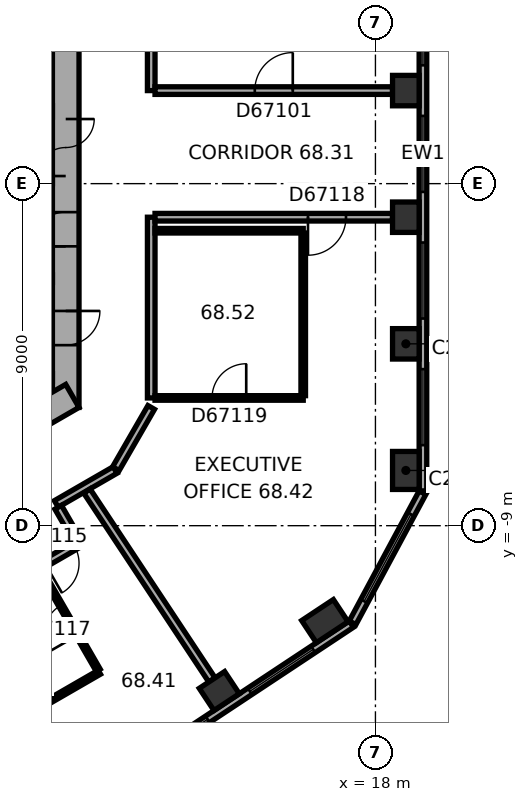
"""IFC4 building model, lengths in metres.
Left out: names, types, materials, properties, quantities, classifications, styles, units other than length and angle.
Written with IfcOpenShell. Run it as: python <this file> out.ifc"""

import sys

from ifc_helpers import new_model, si_unit, direction, frame, frame_2d, origin, origin_2d, place, context, subcontext, project, spatial, rectangle, extrude, element, fill, save


model = new_model("IFC4")
c1 = context("Model", 3, precision=1e-05, world=origin(), true_north=direction((0.0, 1.0)))
c2 = subcontext(c1, "Body", "Model", "MODEL_VIEW")
j1 = project(units=[si_unit("LENGTHUNIT", "METRE"), si_unit("PLANEANGLEUNIT", "RADIAN")], contexts=[c1])
p1 = place(None, origin())
s1 = spatial("IfcSite", under=j1, at=p1, CompositionType="ELEMENT")
p2 = place(p1, origin())
s2 = spatial("IfcBuilding", under=s1, at=p2, CompositionType="ELEMENT")
p3 = place(p2, frame((0.0, 0.0, 274.6)))
s3 = spatial("IfcBuildingStorey", under=s2, at=p3, CompositionType="ELEMENT", Elevation=274.6)
p4 = place(p3, frame((18.8, -7.547, 0.0), z_axis=(0.0, 0.0, 1.0), x_axis=(0.0, 1.0, 0.0)))
e1 = element("IfcColumn", 1, at=p4, inside=s3, PredefinedType="COLUMN", context=c2, shape_type="SweptSolid", body=[
    extrude(rectangle(XDim=1.0, YDim=0.7, at=origin_2d()), origin(), (0.0, 0.0, 1.0), 3.7),
])
for number, where, z_axis, x_axis in (
    (2, (18.8, -4.215, 0.0), (0.0, 0.0, 1.0), (0.0, 1.0, 0.0)),
    (3, (18.8, -0.883, 0.0), (0.0, 0.0, 1.0), (0.0, 1.0, 0.0)),
    (4, (18.8, 2.448, 0.0), (0.0, 0.0, 1.0), (0.0, 1.0, 0.0)),
    (5, (13.891, -13.351, 0.0), (0.0, 0.0, 1.0), (0.834, 0.552, 0.0)),
):
    element("IfcColumn", number, at=place(p3, frame(where, z_axis=z_axis, x_axis=x_axis)), inside=s3, PredefinedType="COLUMN", context=c2, shape_type="SweptSolid", body=[
        extrude(rectangle(XDim=0.8, YDim=0.7, at=origin_2d()), origin(), (0.0, 0.0, 1.0), 3.7),
    ])
p5 = place(p3, frame((16.669, -11.512, 0.0), z_axis=(0.0, 0.0, 1.0), x_axis=(0.833885822067, 0.551936985312, 0.0)))
e6 = element("IfcColumn", 6, at=p5, inside=s3, PredefinedType="COLUMN", context=c2, shape_type="SweptSolid", body=[
    extrude(rectangle(XDim=1.0, YDim=0.7, at=origin_2d()), origin(), (0.0, 0.0, 1.0), 3.7),
])
p6 = place(p3, frame((9.85, -5.889, 0.0), z_axis=(0.0, 0.0, 1.0), x_axis=(0.0, 1.0, 0.0)))
e7 = element("IfcWall", 7, at=p6, inside=s3, PredefinedType="SHEAR", context=c2, shape_type="SweptSolid", body=[
    extrude(rectangle(XDim=11.778, YDim=0.7, at=frame_2d((5.889, 0.0))), origin(), (0.0, 0.0, 1.0), 3.7),
])
p7 = place(p6, frame((6.089, 0.0, 0.0)))
e8 = element("IfcOpeningElement", 8, at=p7, cuts=e7, PredefinedType="OPENING", context=c2, shape_type="SweptSolid", body=[
    extrude(rectangle(XDim=1.5, YDim=2.1, at=frame_2d((0.75, 1.05))), frame((0.0, 0.36, 0.0), z_axis=(0.0, -1.0, 0.0), x_axis=(1.0, 0.0, 0.0)), (0.0, 0.0, 1.0), 0.72),
])
p8 = place(p6, frame((1.639, 0.0, 0.0)))
e9 = element("IfcOpeningElement", 9, at=p8, cuts=e7, PredefinedType="OPENING", context=c2, shape_type="SweptSolid", body=[
    extrude(rectangle(XDim=0.9, YDim=2.1, at=frame_2d((0.45, 1.05))), frame((0.0, 0.36, 0.0), z_axis=(0.0, -1.0, 0.0), x_axis=(1.0, 0.0, 0.0)), (0.0, 0.0, 1.0), 0.72),
])
p9 = place(p6, frame((4.239, 0.0, 0.0)))
e10 = element("IfcOpeningElement", 10, at=p9, cuts=e7, PredefinedType="OPENING", context=c2, shape_type="SweptSolid", body=[
    extrude(rectangle(XDim=0.9, YDim=2.1, at=frame_2d((0.45, 1.05))), frame((0.0, 0.36, 0.0), z_axis=(0.0, -1.0, 0.0), x_axis=(1.0, 0.0, 0.0)), (0.0, 0.0, 1.0), 0.72),
])
p10 = place(p3, frame((-0.175, -11.475, 0.0), z_axis=(0.0, 0.0, 1.0), x_axis=(0.866026453023, 0.499998182661, 0.0)))
e11 = element("IfcWall", 11, at=p10, inside=s3, PredefinedType="SHEAR", context=c2, shape_type="SweptSolid", body=[
    extrude(rectangle(XDim=11.778, YDim=0.7, at=frame_2d((5.889, 0.0))), origin(), (0.0, 0.0, 1.0), 3.7),
])
p11 = place(p10, frame((2.439, 0.0, 0.0)))
e12 = element("IfcOpeningElement", 12, at=p11, cuts=e11, PredefinedType="OPENING", context=c2, shape_type="SweptSolid", body=[
    extrude(rectangle(XDim=1.1, YDim=2.1, at=frame_2d((0.55, 1.05))), frame((0.0, 0.36, 0.0), z_axis=(0.0, -1.0, 0.0), x_axis=(1.0, 0.0, 0.0)), (0.0, 0.0, 1.0), 0.72),
])
p12 = place(p10, frame((5.039, 0.0, 0.0)))
e13 = element("IfcOpeningElement", 13, at=p12, cuts=e11, PredefinedType="OPENING", context=c2, shape_type="SweptSolid", body=[
    extrude(rectangle(XDim=1.1, YDim=2.1, at=frame_2d((0.55, 1.05))), frame((0.0, 0.36, 0.0), z_axis=(0.0, -1.0, 0.0), x_axis=(1.0, 0.0, 0.0)), (0.0, 0.0, 1.0), 0.72),
])
p13 = place(p10, frame((7.639, 0.0, 0.0)))
e14 = element("IfcOpeningElement", 14, at=p13, cuts=e11, PredefinedType="OPENING", context=c2, shape_type="SweptSolid", body=[
    extrude(rectangle(XDim=1.1, YDim=2.1, at=frame_2d((0.55, 1.05))), frame((0.0, 0.36, 0.0), z_axis=(0.0, -1.0, 0.0), x_axis=(1.0, 0.0, 0.0)), (0.0, 0.0, 1.0), 0.72),
])
p14 = place(p3, frame((19.25, -8.084, 0.0), z_axis=(0.0, 0.0, 1.0), x_axis=(0.0, 1.0, 0.0)))
e15 = element("IfcWall", 15, at=p14, inside=s3, PredefinedType="STANDARD", context=c2, shape_type="SweptSolid", body=[
    extrude(rectangle(XDim=17.731, YDim=0.2, at=frame_2d((8.866, 0.0))), origin(), (0.0, 0.0, 1.0), 3.7),
])
p15 = place(p14, frame((1.203, 0.0, 0.9)))
e16 = element("IfcOpeningElement", 16, at=p15, cuts=e15, PredefinedType="OPENING", context=c2, shape_type="SweptSolid", body=[
    extrude(rectangle(XDim=2.0, YDim=2.0, at=frame_2d((1.0, 1.0))), frame((0.0, 0.11, 0.0), z_axis=(0.0, -1.0, 0.0), x_axis=(1.0, 0.0, 0.0)), (0.0, 0.0, 1.0), 0.22),
])
p16 = place(p14, frame((4.535, 0.0, 0.9)))
e17 = element("IfcOpeningElement", 17, at=p16, cuts=e15, PredefinedType="OPENING", context=c2, shape_type="SweptSolid", body=[
    extrude(rectangle(XDim=2.0, YDim=2.0, at=frame_2d((1.0, 1.0))), frame((0.0, 0.11, 0.0), z_axis=(0.0, -1.0, 0.0), x_axis=(1.0, 0.0, 0.0)), (0.0, 0.0, 1.0), 0.22),
])
p17 = place(p14, frame((7.866, 0.0, 0.9)))
e18 = element("IfcOpeningElement", 18, at=p17, cuts=e15, PredefinedType="OPENING", context=c2, shape_type="SweptSolid", body=[
    extrude(rectangle(XDim=2.0, YDim=2.0, at=frame_2d((1.0, 1.0))), frame((0.0, 0.11, 0.0), z_axis=(0.0, -1.0, 0.0), x_axis=(1.0, 0.0, 0.0)), (0.0, 0.0, 1.0), 0.22),
])
p18 = place(p14, frame((11.198, 0.0, 0.9)))
e19 = element("IfcOpeningElement", 19, at=p18, cuts=e15, PredefinedType="OPENING", context=c2, shape_type="SweptSolid", body=[
    extrude(rectangle(XDim=2.0, YDim=2.0, at=frame_2d((1.0, 1.0))), frame((0.0, 0.11, 0.0), z_axis=(0.0, -1.0, 0.0), x_axis=(1.0, 0.0, 0.0)), (0.0, 0.0, 1.0), 0.22),
])
p19 = place(p14, frame((14.53, 0.0, 0.9)))
e20 = element("IfcOpeningElement", 20, at=p19, cuts=e15, PredefinedType="OPENING", context=c2, shape_type="SweptSolid", body=[
    extrude(rectangle(XDim=2.0, YDim=2.0, at=frame_2d((1.0, 1.0))), frame((0.0, 0.11, 0.0), z_axis=(0.0, -1.0, 0.0), x_axis=(1.0, 0.0, 0.0)), (0.0, 0.0, 1.0), 0.22),
])
p20 = place(p3, frame((2.58, -21.377, 0.0), z_axis=(0.0, 0.0, 1.0), x_axis=(0.833888592176, 0.551932800112, 0.0)))
e21 = element("IfcWall", 21, at=p20, inside=s3, PredefinedType="STANDARD", context=c2, shape_type="SweptSolid", body=[
    extrude(rectangle(XDim=17.731, YDim=0.2, at=frame_2d((8.866, 0.0))), origin(), (0.0, 0.0, 1.0), 3.7),
])
p21 = place(p20, frame((1.202, 0.0, 0.9)))
e22 = element("IfcOpeningElement", 22, at=p21, cuts=e21, PredefinedType="OPENING", context=c2, shape_type="SweptSolid", body=[
    extrude(rectangle(XDim=2.0, YDim=2.0, at=frame_2d((1.0, 1.0))), frame((0.0, 0.11, 0.0), z_axis=(0.0, -1.0, 0.0), x_axis=(1.0, 0.0, 0.0)), (0.0, 0.0, 1.0), 0.22),
])
p22 = place(p20, frame((4.533, 0.0, 0.9)))
e23 = element("IfcOpeningElement", 23, at=p22, cuts=e21, PredefinedType="OPENING", context=c2, shape_type="SweptSolid", body=[
    extrude(rectangle(XDim=2.0, YDim=2.0, at=frame_2d((1.0, 1.0))), frame((0.0, 0.11, 0.0), z_axis=(0.0, -1.0, 0.0), x_axis=(1.0, 0.0, 0.0)), (0.0, 0.0, 1.0), 0.22),
])
p23 = place(p20, frame((7.865, 0.0, 0.9)))
e24 = element("IfcOpeningElement", 24, at=p23, cuts=e21, PredefinedType="OPENING", context=c2, shape_type="SweptSolid", body=[
    extrude(rectangle(XDim=2.0, YDim=2.0, at=frame_2d((1.0, 1.0))), frame((0.0, 0.11, 0.0), z_axis=(0.0, -1.0, 0.0), x_axis=(1.0, 0.0, 0.0)), (0.0, 0.0, 1.0), 0.22),
])
p24 = place(p20, frame((11.197, 0.0, 0.9)))
e25 = element("IfcOpeningElement", 25, at=p24, cuts=e21, PredefinedType="OPENING", context=c2, shape_type="SweptSolid", body=[
    extrude(rectangle(XDim=2.0, YDim=2.0, at=frame_2d((1.0, 1.0))), frame((0.0, 0.11, 0.0), z_axis=(0.0, -1.0, 0.0), x_axis=(1.0, 0.0, 0.0)), (0.0, 0.0, 1.0), 0.22),
])
p25 = place(p20, frame((14.528, 0.0, 0.9)))
e26 = element("IfcOpeningElement", 26, at=p25, cuts=e21, PredefinedType="OPENING", context=c2, shape_type="SweptSolid", body=[
    extrude(rectangle(XDim=2.0, YDim=2.0, at=frame_2d((1.0, 1.0))), frame((0.0, 0.11, 0.0), z_axis=(0.0, -1.0, 0.0), x_axis=(1.0, 0.0, 0.0)), (0.0, 0.0, 1.0), 0.22),
])
p26 = place(p3, frame((17.399, -11.554, 0.0), z_axis=(0.0, 0.0, 1.0), x_axis=(0.473309051311, 0.880896442238, 0.0)))
e27 = element("IfcWall", 27, at=p26, inside=s3, PredefinedType="STANDARD", context=c2, shape_type="SweptSolid", body=[
    extrude(rectangle(XDim=3.886, YDim=0.2, at=frame_2d((1.943, 0.0))), origin(), (0.0, 0.0, 1.0), 3.7),
])
p27 = place(p26, frame((0.643, 0.0, 0.9)))
e28 = element("IfcOpeningElement", 28, at=p27, cuts=e27, PredefinedType="OPENING", context=c2, shape_type="SweptSolid", body=[
    extrude(rectangle(XDim=2.6, YDim=2.0, at=frame_2d((1.3, 1.0))), frame((0.0, 0.11, 0.0), z_axis=(0.0, -1.0, 0.0), x_axis=(1.0, 0.0, 0.0)), (0.0, 0.0, 1.0), 0.22),
])
for number, where, z_axis, x_axis in (
    (29, (7.3, -5.1, 0.0), (0.0, 0.0, 1.0), (1.0, 0.0, 0.0)),
    (30, (7.3, -2.5, 0.0), (0.0, 0.0, 1.0), (1.0, 0.0, 0.0)),
    (31, (7.3, 0.1, 0.0), (0.0, 0.0, 1.0), (1.0, 0.0, 0.0)),
):
    element("IfcWall", number, at=place(p3, frame(where, z_axis=z_axis, x_axis=x_axis)), inside=s3, PredefinedType="PARTITIONING", context=c2, shape_type="SweptSolid", body=[
        extrude(rectangle(XDim=2.2, YDim=0.2, at=frame_2d((1.1, 0.0))), origin(), (0.0, 0.0, 1.0), 3.35),
    ])
p28 = place(p3, frame((7.3, 1.9, 0.0), z_axis=(0.0, 0.0, 1.0), x_axis=(1.0, 0.0, 0.0)))
e32 = element("IfcWall", 32, at=p28, inside=s3, PredefinedType="SHEAR", context=c2, shape_type="SweptSolid", body=[
    extrude(rectangle(XDim=2.2, YDim=0.3, at=frame_2d((1.1, 0.0))), origin(), (0.0, 0.0, 1.0), 3.35),
])
p29 = place(p28, frame((0.7, 0.0, 0.0)))
e33 = element("IfcOpeningElement", 33, at=p29, cuts=e32, PredefinedType="OPENING", context=c2, shape_type="SweptSolid", body=[
    extrude(rectangle(XDim=1.1, YDim=2.1, at=frame_2d((0.55, 1.05))), frame((0.0, 0.16, 0.0), z_axis=(0.0, -1.0, 0.0), x_axis=(1.0, 0.0, 0.0)), (0.0, 0.0, 1.0), 0.32),
])
p30 = place(p3, frame((6.71, -11.485, 0.0), z_axis=(0.0, 0.0, 1.0), x_axis=(0.866021232452, 0.500007224889, 0.0)))
e34 = element("IfcWall", 34, at=p30, inside=s3, PredefinedType="PARTITIONING", context=c2, shape_type="SweptSolid", body=[
    extrude(rectangle(XDim=4.032, YDim=0.2, at=frame_2d((2.016, 0.0))), origin(), (0.0, 0.0, 1.0), 3.35),
])
p31 = place(p30, frame((2.991, 0.0, 0.0)))
e35 = element("IfcOpeningElement", 35, at=p31, cuts=e34, PredefinedType="OPENING", context=c2, shape_type="SweptSolid", body=[
    extrude(rectangle(XDim=0.9, YDim=2.1, at=frame_2d((0.45, 1.05))), frame((0.0, 0.11, 0.0), z_axis=(0.0, -1.0, 0.0), x_axis=(1.0, 0.0, 0.0)), (0.0, 0.0, 1.0), 0.22),
])
p32 = place(p3, frame((9.602, -8.428, 0.0), z_axis=(0.0, 0.0, 1.0), x_axis=(0.865999114786, 0.500045531117, 0.0)))
e36 = element("IfcWall", 36, at=p32, inside=s3, PredefinedType="PARTITIONING", context=c2, shape_type="SweptSolid", body=[
    extrude(rectangle(XDim=1.788, YDim=0.2, at=frame_2d((0.894, 0.0))), origin(), (0.0, 0.0, 1.0), 3.35),
])
p33 = place(p3, frame((10.152, -9.382, 0.0), z_axis=(0.0, 0.0, 1.0), x_axis=(-0.499968756647, 0.866043441391, 0.0)))
e37 = element("IfcWall", 37, at=p33, inside=s3, PredefinedType="PARTITIONING", context=c2, shape_type="SweptSolid", body=[
    extrude(rectangle(XDim=1.001, YDim=0.2, at=frame_2d((0.5, 0.0))), origin(), (0.0, 0.0, 1.0), 3.35),
])
p34 = place(p3, frame((10.705, -12.804, 0.0), z_axis=(0.0, 0.0, 1.0), x_axis=(-0.500026023896, 0.86601037836, 0.0)))
e38 = element("IfcWall", 38, at=p34, inside=s3, PredefinedType="PARTITIONING", context=c2, shape_type="SweptSolid", body=[
    extrude(rectangle(XDim=3.04, YDim=0.12, at=frame_2d((1.52, 0.0))), origin(), (0.0, 0.0, 1.0), 3.35),
])
p35 = place(p34, frame((1.07, 0.0, 0.0)))
e39 = element("IfcOpeningElement", 39, at=p35, cuts=e38, PredefinedType="OPENING", context=c2, shape_type="SweptSolid", body=[
    extrude(rectangle(XDim=0.9, YDim=2.1, at=frame_2d((0.45, 1.05))), frame((0.0, 0.07, 0.0), z_axis=(0.0, -1.0, 0.0), x_axis=(1.0, 0.0, 0.0)), (0.0, 0.0, 1.0), 0.14),
])
p36 = place(p3, frame((10.735, -12.856, 0.0), z_axis=(0.0, 0.0, 1.0), x_axis=(-0.865997131366, -0.500048966069, 0.0)))
e40 = element("IfcWall", 40, at=p36, inside=s3, PredefinedType="PARTITIONING", context=c2, shape_type="SweptSolid", body=[
    extrude(rectangle(XDim=2.74, YDim=0.12, at=frame_2d((1.37, 0.0))), origin(), (0.0, 0.0, 1.0), 3.35),
])
p37 = place(p3, frame((11.17, -7.5, 0.0), z_axis=(0.0, 0.0, 1.0), x_axis=(0.500006454166, 0.866021677438, 0.0)))
e41 = element("IfcWall", 41, at=p37, inside=s3, PredefinedType="PARTITIONING", context=c2, shape_type="SweptSolid", body=[
    extrude(rectangle(XDim=1.86, YDim=0.2, at=frame_2d((0.93, 0.0))), origin(), (0.0, 0.0, 1.0), 3.35),
])
p38 = place(p3, frame((12.1, -5.639, 0.0), z_axis=(0.0, 0.0, 1.0), x_axis=(0.0, 1.0, 0.0)))
e42 = element("IfcWall", 42, at=p38, inside=s3, PredefinedType="PARTITIONING", context=c2, shape_type="SweptSolid", body=[
    extrude(rectangle(XDim=4.756, YDim=0.2, at=frame_2d((2.378, 0.0))), origin(), (0.0, 0.0, 1.0), 3.35),
])
p39 = place(p3, frame((12.1, 2.448, 0.0), z_axis=(0.0, 0.0, 1.0), x_axis=(0.0, 1.0, 0.0)))
e43 = element("IfcWall", 43, at=p39, inside=s3, PredefinedType="PARTITIONING", context=c2, shape_type="SweptSolid", body=[
    extrude(rectangle(XDim=3.441, YDim=0.2, at=frame_2d((1.72, 0.0))), origin(), (0.0, 0.0, 1.0), 3.35),
])
p40 = place(p3, frame((12.2, -1.239, 0.0), z_axis=(0.0, 0.0, 1.0), x_axis=(1.0, 0.0, 0.0)))
e44 = element("IfcWall", 44, at=p40, inside=s3, PredefinedType="PARTITIONING", context=c2, shape_type="SweptSolid", body=[
    extrude(rectangle(XDim=3.9, YDim=0.12, at=frame_2d((1.95, 0.0))), origin(), (0.0, 0.0, 1.0), 2.65),
])
p41 = place(p3, frame((12.2, -0.883, 0.0), z_axis=(0.0, 0.0, 1.0), x_axis=(1.0, 0.0, 0.0)))
e45 = element("IfcWall", 45, at=p41, inside=s3, PredefinedType="PARTITIONING", context=c2, shape_type="SweptSolid", body=[
    extrude(rectangle(XDim=6.25, YDim=0.2, at=frame_2d((3.125, 0.0))), origin(), (0.0, 0.0, 1.0), 2.65),
])
p42 = place(p41, frame((4.025, 0.0, 0.0)))
e46 = element("IfcOpeningElement", 46, at=p42, cuts=e45, PredefinedType="OPENING", context=c2, shape_type="SweptSolid", body=[
    extrude(rectangle(XDim=1.0, YDim=2.1, at=frame_2d((0.5, 1.05))), frame((0.0, 0.11, 0.0), z_axis=(0.0, -1.0, 0.0), x_axis=(1.0, 0.0, 0.0)), (0.0, 0.0, 1.0), 0.22),
])
p43 = place(p3, frame((13.698, -13.059, 0.0), z_axis=(0.0, 0.0, 1.0), x_axis=(-0.551927229301, 0.833892279348, 0.0)))
e47 = element("IfcWall", 47, at=p43, inside=s3, PredefinedType="PARTITIONING", context=c2, shape_type="SweptSolid", body=[
    extrude(rectangle(XDim=5.96, YDim=0.2, at=frame_2d((2.98, 0.0))), origin(), (0.0, 0.0, 1.0), 2.65),
])
p44 = place(p3, frame((16.1, -5.639, 0.0), z_axis=(0.0, 0.0, 1.0), x_axis=(-1.0, 0.0, 0.0)))
e48 = element("IfcWall", 48, at=p44, inside=s3, PredefinedType="PARTITIONING", context=c2, shape_type="SweptSolid", body=[
    extrude(rectangle(XDim=3.9, YDim=0.12, at=frame_2d((1.95, 0.0))), origin(), (0.0, 0.0, 1.0), 3.35),
])
p45 = place(p44, frame((1.5, 0.0, 0.0)))
e49 = element("IfcOpeningElement", 49, at=p45, cuts=e48, PredefinedType="OPENING", context=c2, shape_type="SweptSolid", body=[
    extrude(rectangle(XDim=0.9, YDim=2.1, at=frame_2d((0.45, 1.05))), frame((0.0, 0.07, 0.0), z_axis=(0.0, -1.0, 0.0), x_axis=(1.0, 0.0, 0.0)), (0.0, 0.0, 1.0), 0.14),
])
p46 = place(p3, frame((16.1, -1.299, 0.0), z_axis=(0.0, 0.0, 1.0), x_axis=(0.0, -1.0, 0.0)))
e50 = element("IfcWall", 50, at=p46, inside=s3, PredefinedType="PARTITIONING", context=c2, shape_type="SweptSolid", body=[
    extrude(rectangle(XDim=4.28, YDim=0.12, at=frame_2d((2.14, 0.0))), origin(), (0.0, 0.0, 1.0), 3.35),
])
p47 = place(p3, frame((18.45, 2.448, 0.0), z_axis=(0.0, 0.0, 1.0), x_axis=(-1.0, 0.0, 0.0)))
e51 = element("IfcWall", 51, at=p47, inside=s3, PredefinedType="PARTITIONING", context=c2, shape_type="SweptSolid", body=[
    extrude(rectangle(XDim=6.25, YDim=0.2, at=frame_2d((3.125, 0.0))), origin(), (0.0, 0.0, 1.0), 3.35),
])
p48 = place(p47, frame((2.625, 0.0, 0.0)))
e52 = element("IfcOpeningElement", 52, at=p48, cuts=e51, PredefinedType="OPENING", context=c2, shape_type="SweptSolid", body=[
    extrude(rectangle(XDim=1.0, YDim=2.1, at=frame_2d((0.5, 1.05))), frame((0.0, 0.11, 0.0), z_axis=(0.0, -1.0, 0.0), x_axis=(1.0, 0.0, 0.0)), (0.0, 0.0, 1.0), 0.22),
])
p49 = place(p15, origin())
e53 = element("IfcWindow", 53, at=p49, inside=s3, PartitioningType="SINGLE_PANEL", PredefinedType="WINDOW", context=c2, shape_type="SweptSolid", body=[
    extrude(rectangle(XDim=2.0, YDim=2.0, at=frame_2d((1.0, 1.0))), frame((0.0, 0.03, 0.0), z_axis=(0.0, -1.0, 0.0), x_axis=(1.0, 0.0, 0.0)), (0.0, 0.0, 1.0), 0.06),
])
fill(e16, e53)
p50 = place(p16, origin())
e54 = element("IfcWindow", 54, at=p50, inside=s3, PartitioningType="SINGLE_PANEL", PredefinedType="WINDOW", context=c2, shape_type="SweptSolid", body=[
    extrude(rectangle(XDim=2.0, YDim=2.0, at=frame_2d((1.0, 1.0))), frame((0.0, 0.03, 0.0), z_axis=(0.0, -1.0, 0.0), x_axis=(1.0, 0.0, 0.0)), (0.0, 0.0, 1.0), 0.06),
])
fill(e17, e54)
p51 = place(p17, origin())
e55 = element("IfcWindow", 55, at=p51, inside=s3, PartitioningType="SINGLE_PANEL", PredefinedType="WINDOW", context=c2, shape_type="SweptSolid", body=[
    extrude(rectangle(XDim=2.0, YDim=2.0, at=frame_2d((1.0, 1.0))), frame((0.0, 0.03, 0.0), z_axis=(0.0, -1.0, 0.0), x_axis=(1.0, 0.0, 0.0)), (0.0, 0.0, 1.0), 0.06),
])
fill(e18, e55)
p52 = place(p18, origin())
e56 = element("IfcWindow", 56, at=p52, inside=s3, PartitioningType="SINGLE_PANEL", PredefinedType="WINDOW", context=c2, shape_type="SweptSolid", body=[
    extrude(rectangle(XDim=2.0, YDim=2.0, at=frame_2d((1.0, 1.0))), frame((0.0, 0.03, 0.0), z_axis=(0.0, -1.0, 0.0), x_axis=(1.0, 0.0, 0.0)), (0.0, 0.0, 1.0), 0.06),
])
fill(e19, e56)
p53 = place(p24, origin())
e57 = element("IfcWindow", 57, at=p53, inside=s3, PartitioningType="SINGLE_PANEL", PredefinedType="WINDOW", context=c2, shape_type="SweptSolid", body=[
    extrude(rectangle(XDim=2.0, YDim=2.0, at=frame_2d((1.0, 1.0))), frame((0.0, 0.03, 0.0), z_axis=(0.0, -1.0, 0.0), x_axis=(1.0, 0.0, 0.0)), (0.0, 0.0, 1.0), 0.06),
])
fill(e25, e57)
p54 = place(p25, origin())
e58 = element("IfcWindow", 58, at=p54, inside=s3, PartitioningType="SINGLE_PANEL", PredefinedType="WINDOW", context=c2, shape_type="SweptSolid", body=[
    extrude(rectangle(XDim=2.0, YDim=2.0, at=frame_2d((1.0, 1.0))), frame((0.0, 0.03, 0.0), z_axis=(0.0, -1.0, 0.0), x_axis=(1.0, 0.0, 0.0)), (0.0, 0.0, 1.0), 0.06),
])
fill(e26, e58)
p55 = place(p27, origin())
e59 = element("IfcWindow", 59, at=p55, inside=s3, PartitioningType="SINGLE_PANEL", PredefinedType="WINDOW", context=c2, shape_type="SweptSolid", body=[
    extrude(rectangle(XDim=2.6, YDim=2.0, at=frame_2d((1.3, 1.0))), frame((0.0, 0.03, 0.0), z_axis=(0.0, -1.0, 0.0), x_axis=(1.0, 0.0, 0.0)), (0.0, 0.0, 1.0), 0.06),
])
fill(e28, e59)
p56 = place(p7, origin())
e60 = element("IfcDoor", 60, at=p56, inside=s3, OperationType="DOUBLE_DOOR_SINGLE_SWING", PredefinedType="DOOR", context=c2, shape_type="SweptSolid", body=[
    extrude(rectangle(XDim=1.5, YDim=2.1, at=frame_2d((0.75, 1.05))), frame((0.0, 0.025, 0.0), z_axis=(0.0, -1.0, 0.0), x_axis=(1.0, 0.0, 0.0)), (0.0, 0.0, 1.0), 0.05),
])
fill(e8, e60)
p57 = place(p8, origin())
e61 = element("IfcDoor", 61, at=p57, inside=s3, OperationType="SINGLE_SWING_LEFT", PredefinedType="DOOR", context=c2, shape_type="SweptSolid", body=[
    extrude(rectangle(XDim=0.9, YDim=2.1, at=frame_2d((0.45, 1.05))), frame((0.0, 0.025, 0.0), z_axis=(0.0, -1.0, 0.0), x_axis=(1.0, 0.0, 0.0)), (0.0, 0.0, 1.0), 0.05),
])
fill(e9, e61)
p58 = place(p9, origin())
e62 = element("IfcDoor", 62, at=p58, inside=s3, OperationType="SINGLE_SWING_LEFT", PredefinedType="DOOR", context=c2, shape_type="SweptSolid", body=[
    extrude(rectangle(XDim=0.9, YDim=2.1, at=frame_2d((0.45, 1.05))), frame((0.0, 0.025, 0.0), z_axis=(0.0, -1.0, 0.0), x_axis=(1.0, 0.0, 0.0)), (0.0, 0.0, 1.0), 0.05),
])
fill(e10, e62)
p59 = place(p48, origin())
e63 = element("IfcDoor", 63, at=p59, inside=s3, OperationType="SINGLE_SWING_LEFT", PredefinedType="DOOR", context=c2, shape_type="SweptSolid", body=[
    extrude(rectangle(XDim=1.0, YDim=2.1, at=frame_2d((0.5, 1.05))), frame((0.0, 0.025, 0.0), z_axis=(0.0, -1.0, 0.0), x_axis=(1.0, 0.0, 0.0)), (0.0, 0.0, 1.0), 0.05),
])
fill(e52, e63)
p60 = place(p31, origin())
e64 = element("IfcDoor", 64, at=p60, inside=s3, OperationType="SINGLE_SWING_LEFT", PredefinedType="DOOR", context=c2, shape_type="SweptSolid", body=[
    extrude(rectangle(XDim=0.9, YDim=2.1, at=frame_2d((0.45, 1.05))), frame((0.0, 0.025, 0.0), z_axis=(0.0, -1.0, 0.0), x_axis=(1.0, 0.0, 0.0)), (0.0, 0.0, 1.0), 0.05),
])
fill(e35, e64)
p61 = place(p35, origin())
e65 = element("IfcDoor", 65, at=p61, inside=s3, OperationType="SINGLE_SWING_LEFT", PredefinedType="DOOR", context=c2, shape_type="SweptSolid", body=[
    extrude(rectangle(XDim=0.9, YDim=2.1, at=frame_2d((0.45, 1.05))), frame((0.0, 0.025, 0.0), z_axis=(0.0, -1.0, 0.0), x_axis=(1.0, 0.0, 0.0)), (0.0, 0.0, 1.0), 0.05),
])
fill(e39, e65)
p62 = place(p42, origin())
e66 = element("IfcDoor", 66, at=p62, inside=s3, OperationType="SINGLE_SWING_LEFT", PredefinedType="DOOR", context=c2, shape_type="SweptSolid", body=[
    extrude(rectangle(XDim=1.0, YDim=2.1, at=frame_2d((0.5, 1.05))), frame((0.0, 0.025, 0.0), z_axis=(0.0, -1.0, 0.0), x_axis=(1.0, 0.0, 0.0)), (0.0, 0.0, 1.0), 0.05),
])
fill(e46, e66)
p63 = place(p45, origin())
e67 = element("IfcDoor", 67, at=p63, inside=s3, OperationType="SINGLE_SWING_LEFT", PredefinedType="DOOR", context=c2, shape_type="SweptSolid", body=[
    extrude(rectangle(XDim=0.9, YDim=2.1, at=frame_2d((0.45, 1.05))), frame((0.0, 0.025, 0.0), z_axis=(0.0, -1.0, 0.0), x_axis=(1.0, 0.0, 0.0)), (0.0, 0.0, 1.0), 0.05),
])
fill(e49, e67)
save(model, sys.argv[1])
